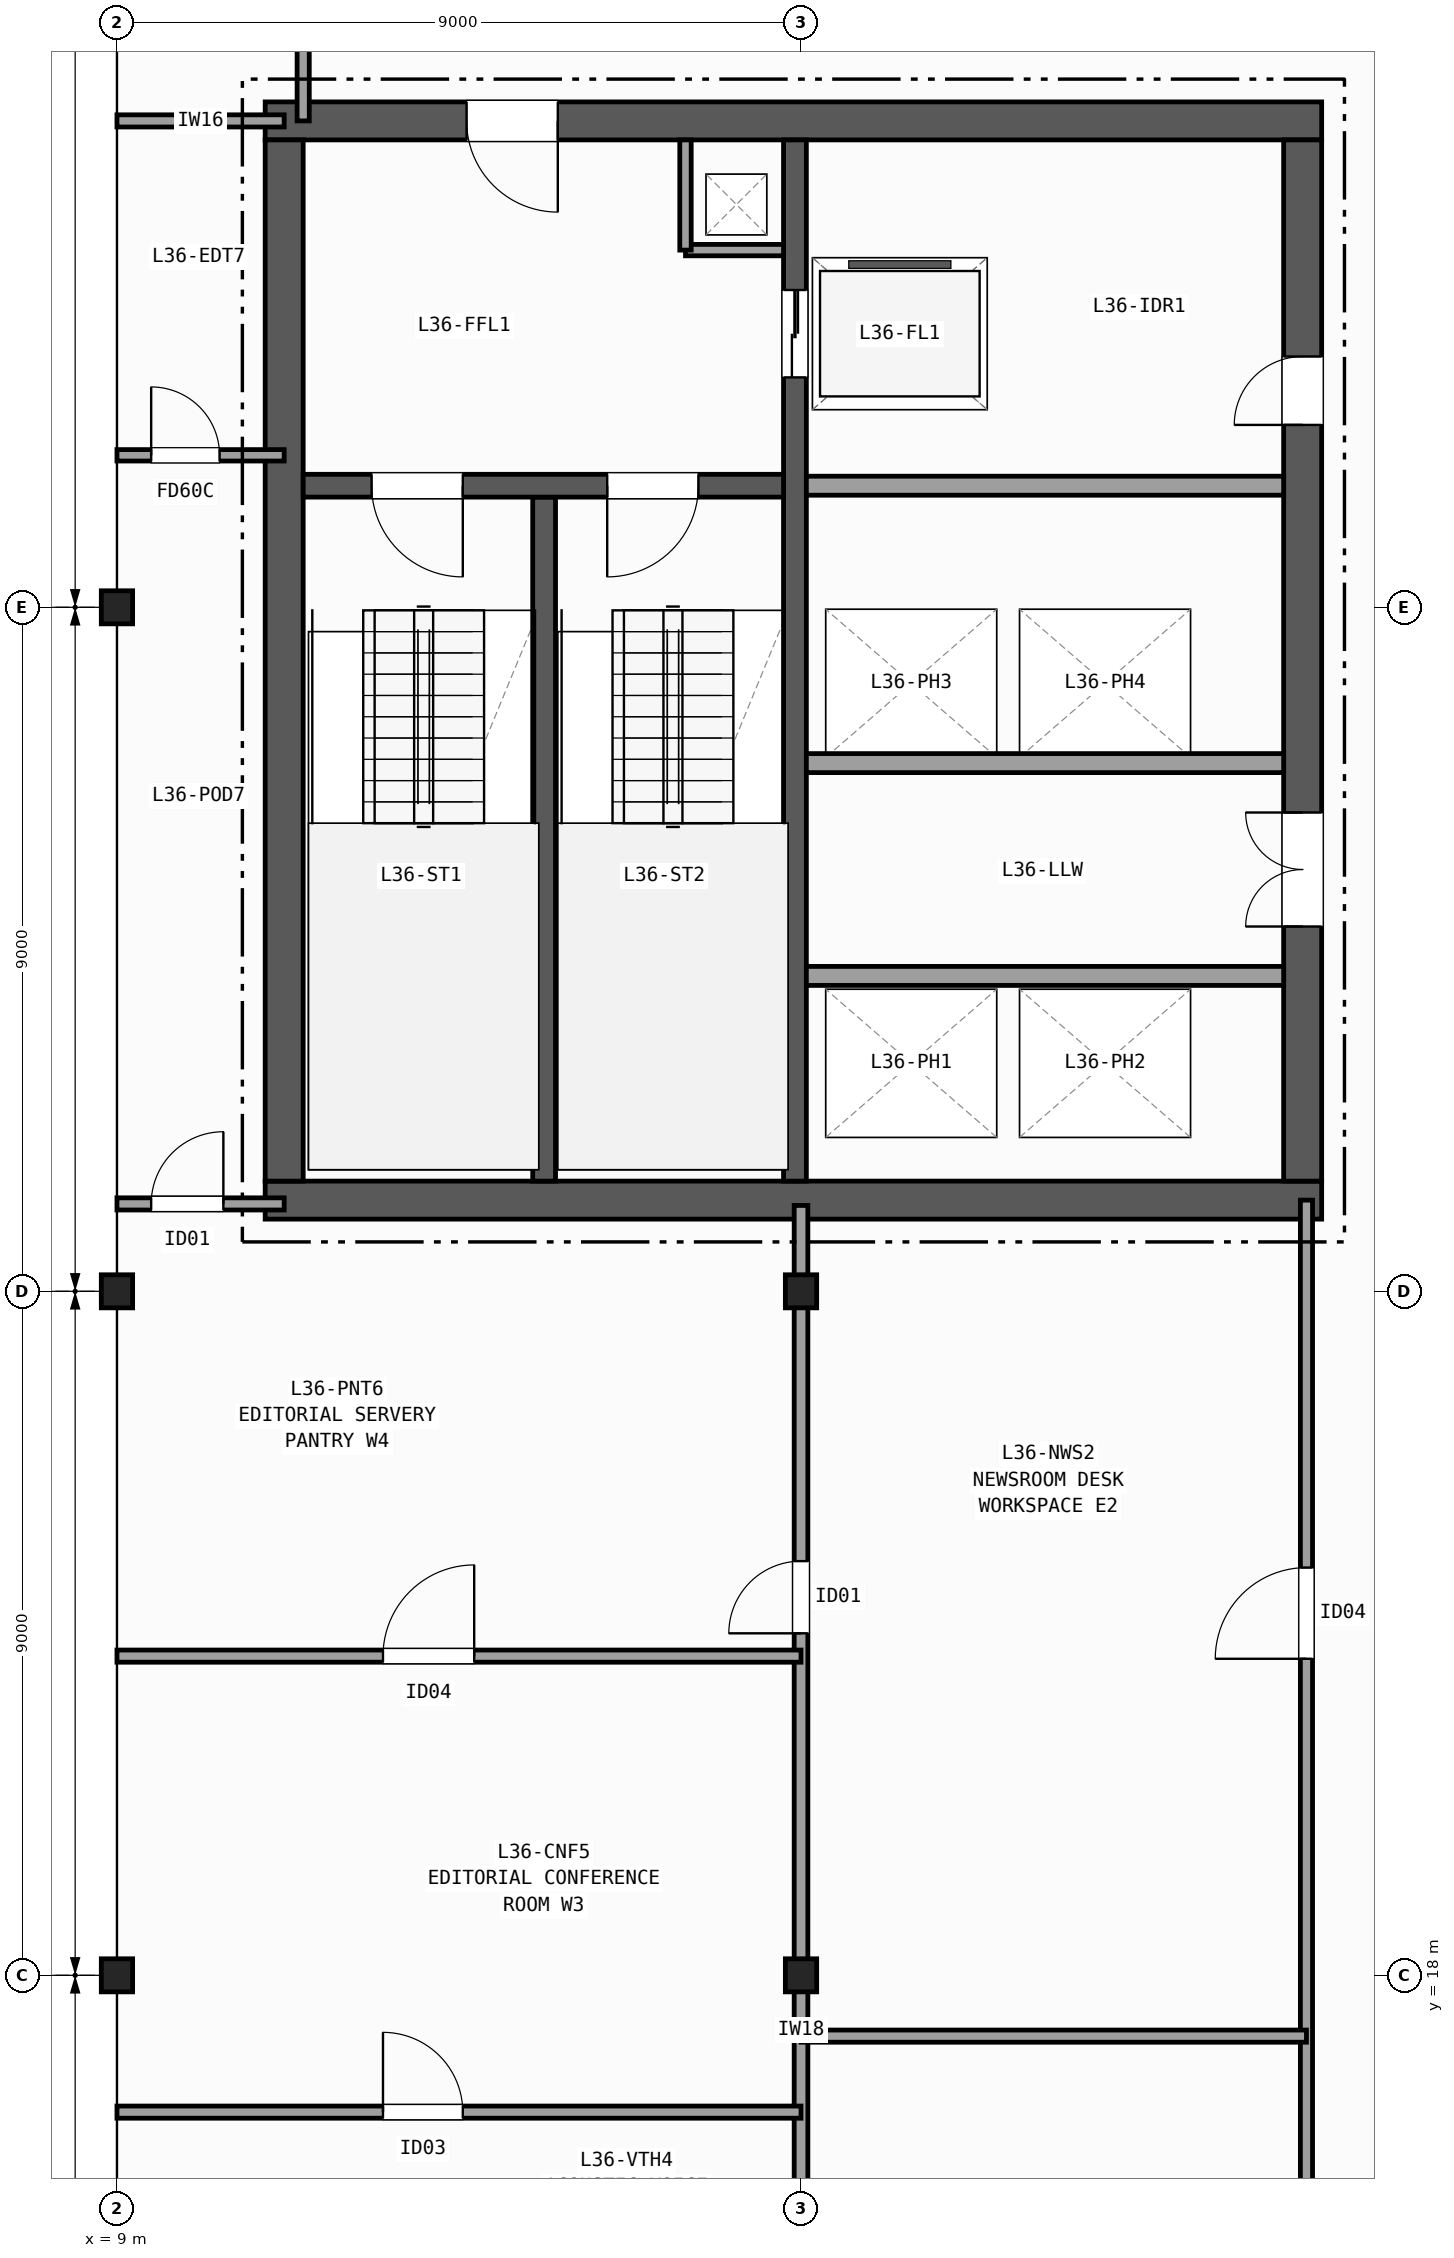
"""IFC4 building model, lengths in metres.
Left out: names, types, materials, properties, quantities, classifications, styles, units other than length and angle.
Written with IfcOpenShell. Run it as: python <this file> out.ifc"""

import sys

from ifc_helpers import new_model, si_unit, direction, frame, frame_2d, origin, origin_2d, place, context, subcontext, project, spatial, rectangle, i_section, extrude, element, fill, save


model = new_model("IFC4")
c1 = context("Model", 3, precision=1e-05, world=origin(), true_north=direction((0.0, 1.0)))
c2 = subcontext(c1, "Body", "Model", "MODEL_VIEW")
j1 = project(units=[si_unit("LENGTHUNIT", "METRE"), si_unit("PLANEANGLEUNIT", "RADIAN")], contexts=[c1])
p1 = place(None, origin())
s1 = spatial("IfcSite", under=j1, at=p1, CompositionType="ELEMENT")
p2 = place(p1, origin())
s2 = spatial("IfcBuilding", under=s1, at=p2, CompositionType="ELEMENT")
p3 = place(p2, frame((0.0, 0.0, 147.0)))
s3 = spatial("IfcBuildingStorey", under=s2, at=p3, CompositionType="ELEMENT", Elevation=147.0)
for number, where, z_axis, x_axis in (
    (1, (9.0, 18.0, 0.0), (0.0, 0.0, 1.0), (1.0, 0.0, 0.0)),
    (2, (9.0, 27.0, 0.0), (0.0, 0.0, 1.0), (1.0, 0.0, 0.0)),
    (3, (9.0, 36.0, 0.0), (0.0, 0.0, 1.0), (1.0, 0.0, 0.0)),
    (4, (18.0, 18.0, 0.0), (0.0, 0.0, 1.0), (1.0, 0.0, 0.0)),
    (5, (18.0, 27.0, 0.0), (0.0, 0.0, 1.0), (1.0, 0.0, 0.0)),
):
    element("IfcColumn", number, at=place(p3, frame(where, z_axis=z_axis, x_axis=x_axis)), inside=s3, PredefinedType="COLUMN", context=c2, shape_type="SweptSolid", body=[
        extrude(i_section(OverallWidth=0.412, OverallDepth=0.435, WebThickness=0.036, FlangeThickness=0.057, FilletRadius=0.015, at=origin_2d()), origin(), (0.0, 0.0, 1.0), 3.7),
    ])
p4 = place(p3, frame((10.95, 28.2, 0.0), z_axis=(0.0, 0.0, 1.0), x_axis=(1.0, 0.0, 0.0)))
e6 = element("IfcWall", 6, at=p4, inside=s3, PredefinedType="SHEAR", context=c2, shape_type="SweptSolid", body=[
    extrude(rectangle(XDim=13.9, YDim=0.5, at=frame_2d((6.95, 0.0))), origin(), (0.0, 0.0, 1.0), 3.42),
])
p5 = place(p3, frame((24.85, 42.4, 0.0), z_axis=(0.0, 0.0, 1.0), x_axis=(-1.0, 0.0, 0.0)))
e7 = element("IfcWall", 7, at=p5, inside=s3, PredefinedType="SHEAR", context=c2, shape_type="SweptSolid", body=[
    extrude(rectangle(XDim=13.9, YDim=0.5, at=frame_2d((6.95, 0.0))), origin(), (0.0, 0.0, 1.0), 3.42),
])
p6 = place(p5, frame((10.05, 0.0, 0.0)))
e8 = element("IfcOpeningElement", 8, at=p6, cuts=e7, PredefinedType="OPENING", context=c2, shape_type="SweptSolid", body=[
    extrude(rectangle(XDim=1.2, YDim=2.15, at=frame_2d((0.6, 1.075))), frame((0.0, 0.26, 0.0), z_axis=(0.0, -1.0, 0.0), x_axis=(1.0, 0.0, 0.0)), (0.0, 0.0, 1.0), 0.52),
])
p7 = place(p3, frame((11.2, 42.15, 0.0), z_axis=(0.0, 0.0, 1.0), x_axis=(0.0, -1.0, 0.0)))
e9 = element("IfcWall", 9, at=p7, inside=s3, PredefinedType="SHEAR", context=c2, shape_type="SweptSolid", body=[
    extrude(rectangle(XDim=13.7, YDim=0.5, at=frame_2d((6.85, 0.0))), origin(), (0.0, 0.0, 1.0), 3.42),
])
p8 = place(p3, frame((24.6, 28.45, 0.0), z_axis=(0.0, 0.0, 1.0), x_axis=(0.0, 1.0, 0.0)))
e10 = element("IfcWall", 10, at=p8, inside=s3, PredefinedType="SHEAR", context=c2, shape_type="SweptSolid", body=[
    extrude(rectangle(XDim=13.7, YDim=0.5, at=frame_2d((6.85, 0.0))), origin(), (0.0, 0.0, 1.0), 3.42),
])
p9 = place(p8, frame((3.35, 0.0, 0.0)))
e11 = element("IfcOpeningElement", 11, at=p9, cuts=e10, PredefinedType="OPENING", context=c2, shape_type="SweptSolid", body=[
    extrude(rectangle(XDim=1.5, YDim=2.2, at=frame_2d((0.75, 1.1))), frame((0.0, 0.26, 0.0), z_axis=(0.0, -1.0, 0.0), x_axis=(1.0, 0.0, 0.0)), (0.0, 0.0, 1.0), 0.52),
])
p10 = place(p8, frame((9.95, 0.0, 0.0)))
e12 = element("IfcOpeningElement", 12, at=p10, cuts=e10, PredefinedType="OPENING", context=c2, shape_type="SweptSolid", body=[
    extrude(rectangle(XDim=0.9, YDim=2.1, at=frame_2d((0.45, 1.05))), frame((0.0, 0.26, 0.0), z_axis=(0.0, -1.0, 0.0), x_axis=(1.0, 0.0, 0.0)), (0.0, 0.0, 1.0), 0.52),
])
p11 = place(p3, frame((14.62, 28.45, 0.0), z_axis=(0.0, 0.0, 1.0), x_axis=(0.0, 1.0, 0.0)))
e13 = element("IfcWall", 13, at=p11, inside=s3, PredefinedType="SHEAR", context=c2, shape_type="SweptSolid", body=[
    extrude(rectangle(XDim=9.0, YDim=0.3, at=frame_2d((4.5, 0.0))), origin(), (0.0, 0.0, 1.0), 3.42),
])
p12 = place(p3, frame((17.92, 42.15, 0.0), z_axis=(0.0, 0.0, 1.0), x_axis=(0.0, -1.0, 0.0)))
e14 = element("IfcWall", 14, at=p12, inside=s3, PredefinedType="SHEAR", context=c2, shape_type="SweptSolid", body=[
    extrude(rectangle(XDim=13.7, YDim=0.3, at=frame_2d((6.85, 0.0))), origin(), (0.0, 0.0, 1.0), 3.42),
])
p13 = place(p12, frame((1.975, 0.0, 0.0)))
e15 = element("IfcOpeningElement", 15, at=p13, cuts=e14, PredefinedType="OPENING", context=c2, shape_type="SweptSolid", body=[
    extrude(rectangle(XDim=1.15, YDim=2.15, at=frame_2d((0.575, 1.075))), frame((0.0, 0.16, 0.0), z_axis=(0.0, -1.0, 0.0), x_axis=(1.0, 0.0, 0.0)), (0.0, 0.0, 1.0), 0.32),
])
p14 = place(p3, frame((17.77, 37.6, 0.0), z_axis=(0.0, 0.0, 1.0), x_axis=(-1.0, 0.0, 0.0)))
e16 = element("IfcWall", 16, at=p14, inside=s3, PredefinedType="SHEAR", context=c2, shape_type="SweptSolid", body=[
    extrude(rectangle(XDim=6.32, YDim=0.3, at=frame_2d((3.16, 0.0))), origin(), (0.0, 0.0, 1.0), 3.42),
])
p15 = place(p14, frame((4.22, 0.0, 0.0)))
e17 = element("IfcOpeningElement", 17, at=p15, cuts=e16, PredefinedType="OPENING", context=c2, shape_type="SweptSolid", body=[
    extrude(rectangle(XDim=1.2, YDim=2.15, at=frame_2d((0.6, 1.075))), frame((0.0, 0.16, 0.0), z_axis=(0.0, -1.0, 0.0), x_axis=(1.0, 0.0, 0.0)), (0.0, 0.0, 1.0), 0.32),
])
p16 = place(p14, frame((1.12, 0.0, 0.0)))
e18 = element("IfcOpeningElement", 18, at=p16, cuts=e16, PredefinedType="OPENING", context=c2, shape_type="SweptSolid", body=[
    extrude(rectangle(XDim=1.2, YDim=2.15, at=frame_2d((0.6, 1.075))), frame((0.0, 0.16, 0.0), z_axis=(0.0, -1.0, 0.0), x_axis=(1.0, 0.0, 0.0)), (0.0, 0.0, 1.0), 0.32),
])
p17 = place(p3, frame((16.48, 40.7, 0.0), z_axis=(0.0, 0.0, 1.0), x_axis=(1.0, 0.0, 0.0)))
e19 = element("IfcWall", 19, at=p17, inside=s3, PredefinedType="PARTITIONING", context=c2, shape_type="SweptSolid", body=[
    extrude(rectangle(XDim=1.29, YDim=0.15, at=frame_2d((0.645, 0.0))), origin(), (0.0, 0.0, 1.0), 3.42),
])
p18 = place(p3, frame((16.48, 40.7, 0.0), z_axis=(0.0, 0.0, 1.0), x_axis=(0.0, 1.0, 0.0)))
e20 = element("IfcWall", 20, at=p18, inside=s3, PredefinedType="PARTITIONING", context=c2, shape_type="SweptSolid", body=[
    extrude(rectangle(XDim=1.45, YDim=0.15, at=frame_2d((0.725, 0.0))), origin(), (0.0, 0.0, 1.0), 3.42),
])
for number, where, z_axis, x_axis in (
    (21, (18.07, 37.6, 0.0), (0.0, 0.0, 1.0), (1.0, 0.0, 0.0)),
    (22, (18.07, 31.15, 0.0), (0.0, 0.0, 1.0), (1.0, 0.0, 0.0)),
    (23, (24.35, 33.95, 0.0), (0.0, 0.0, 1.0), (-1.0, 0.0, 0.0)),
):
    element("IfcWall", number, at=place(p3, frame(where, z_axis=z_axis, x_axis=x_axis)), inside=s3, PredefinedType="PARTITIONING", context=c2, shape_type="SweptSolid", body=[
        extrude(rectangle(XDim=6.28, YDim=0.25, at=frame_2d((3.14, 0.0))), origin(), (0.0, 0.0, 1.0), 3.42),
    ])
p19 = place(p3, frame((9.0, 28.15, 0.0), z_axis=(0.0, 0.0, 1.0), x_axis=(1.0, 0.0, 0.0)))
e24 = element("IfcWall", 24, at=p19, inside=s3, PredefinedType="PARTITIONING", context=c2, shape_type="SweptSolid", body=[
    extrude(rectangle(XDim=2.2, YDim=0.16, at=frame_2d((1.1, 0.0))), origin(), (0.0, 0.0, 1.0), 2.634),
])
p20 = place(p19, frame((0.45, 0.0, 0.0)))
e25 = element("IfcOpeningElement", 25, at=p20, cuts=e24, PredefinedType="OPENING", context=c2, shape_type="SweptSolid", body=[
    extrude(rectangle(XDim=0.95, YDim=2.1, at=frame_2d((0.475, 1.05))), frame((0.0, 0.09, 0.0), z_axis=(0.0, -1.0, 0.0), x_axis=(1.0, 0.0, 0.0)), (0.0, 0.0, 1.0), 0.18),
])
p21 = place(p3, frame((9.0, 42.4, 0.0), z_axis=(0.0, 0.0, 1.0), x_axis=(1.0, 0.0, 0.0)))
e26 = element("IfcWall", 26, at=p21, inside=s3, PredefinedType="PARTITIONING", context=c2, shape_type="SweptSolid", body=[
    extrude(rectangle(XDim=2.2, YDim=0.16, at=frame_2d((1.1, 0.0))), origin(), (0.0, 0.0, 1.0), 2.634),
])
p22 = place(p3, frame((11.45, 42.4, 0.0), z_axis=(0.0, 0.0, 1.0), x_axis=(0.0, 1.0, 0.0)))
e27 = element("IfcWall", 27, at=p22, inside=s3, PredefinedType="PARTITIONING", context=c2, shape_type="SweptSolid", body=[
    extrude(rectangle(XDim=2.1, YDim=0.16, at=frame_2d((1.05, 0.0))), origin(), (0.0, 0.0, 1.0), 3.42),
])
p23 = place(p3, frame((9.0, 38.0, 0.0), z_axis=(0.0, 0.0, 1.0), x_axis=(1.0, 0.0, 0.0)))
e28 = element("IfcWall", 28, at=p23, inside=s3, PredefinedType="PARTITIONING", context=c2, shape_type="SweptSolid", body=[
    extrude(rectangle(XDim=2.2, YDim=0.15, at=frame_2d((1.1, 0.0))), origin(), (0.0, 0.0, 1.0), 2.634),
])
p24 = place(p23, frame((0.45, 0.0, 0.0)))
e29 = element("IfcOpeningElement", 29, at=p24, cuts=e28, PredefinedType="OPENING", context=c2, shape_type="SweptSolid", body=[
    extrude(rectangle(XDim=0.9, YDim=2.1, at=frame_2d((0.45, 1.05))), frame((0.0, 0.085, 0.0), z_axis=(0.0, -1.0, 0.0), x_axis=(1.0, 0.0, 0.0)), (0.0, 0.0, 1.0), 0.17),
])
p25 = place(p3, frame((24.65, 9.0, 0.0), z_axis=(0.0, 0.0, 1.0), x_axis=(0.0, 1.0, 0.0)))
e30 = element("IfcWall", 30, at=p25, inside=s3, PredefinedType="PARTITIONING", context=c2, shape_type="SweptSolid", body=[
    extrude(rectangle(XDim=19.2, YDim=0.16, at=frame_2d((9.6, 0.0))), origin(), (0.0, 0.0, 1.0), 2.634),
])
p26 = place(p25, frame((3.6, 0.0, 0.0)))
e31 = element("IfcOpeningElement", 31, at=p26, cuts=e30, PredefinedType="OPENING", context=c2, shape_type="SweptSolid", body=[
    extrude(rectangle(XDim=1.05, YDim=2.15, at=frame_2d((0.525, 1.075))), frame((0.0, 0.09, 0.0), z_axis=(0.0, -1.0, 0.0), x_axis=(1.0, 0.0, 0.0)), (0.0, 0.0, 1.0), 0.18),
])
p27 = place(p25, frame((13.165, 0.0, 0.0)))
e32 = element("IfcOpeningElement", 32, at=p27, cuts=e30, PredefinedType="OPENING", context=c2, shape_type="SweptSolid", body=[
    extrude(rectangle(XDim=1.2, YDim=2.15, at=frame_2d((0.6, 1.075))), frame((0.0, 0.09, 0.0), z_axis=(0.0, -1.0, 0.0), x_axis=(1.0, 0.0, 0.0)), (0.0, 0.0, 1.0), 0.18),
])
p28 = place(p3, frame((18.0, 9.0, 0.0), z_axis=(0.0, 0.0, 1.0), x_axis=(0.0, 1.0, 0.0)))
e33 = element("IfcWall", 33, at=p28, inside=s3, PredefinedType="PARTITIONING", context=c2, shape_type="SweptSolid", body=[
    extrude(rectangle(XDim=19.13, YDim=0.18, at=frame_2d((9.565, 0.0))), origin(), (0.0, 0.0, 1.0), 2.634),
])
p29 = place(p28, frame((2.2, 0.0, 0.0)))
e34 = element("IfcOpeningElement", 34, at=p29, cuts=e33, PredefinedType="OPENING", context=c2, shape_type="SweptSolid", body=[
    extrude(rectangle(XDim=0.86, YDim=2.05, at=frame_2d((0.43, 1.025))), frame((0.0, 0.1, 0.0), z_axis=(0.0, -1.0, 0.0), x_axis=(1.0, 0.0, 0.0)), (0.0, 0.0, 1.0), 0.2),
])
p30 = place(p28, frame((13.5, 0.0, 0.0)))
e35 = element("IfcOpeningElement", 35, at=p30, cuts=e33, PredefinedType="OPENING", context=c2, shape_type="SweptSolid", body=[
    extrude(rectangle(XDim=0.95, YDim=2.1, at=frame_2d((0.475, 1.05))), frame((0.0, 0.1, 0.0), z_axis=(0.0, -1.0, 0.0), x_axis=(1.0, 0.0, 0.0)), (0.0, 0.0, 1.0), 0.2),
])
p31 = place(p3, frame((18.0, 17.2, 0.0), z_axis=(0.0, 0.0, 1.0), x_axis=(1.0, 0.0, 0.0)))
e36 = element("IfcWall", 36, at=p31, inside=s3, PredefinedType="PARTITIONING", context=c2, shape_type="SweptSolid", body=[
    extrude(rectangle(XDim=6.65, YDim=0.16, at=frame_2d((3.325, 0.0))), origin(), (0.0, 0.0, 1.0), 2.789),
])
p32 = place(p3, frame((9.0, 16.2, 0.0), z_axis=(0.0, 0.0, 1.0), x_axis=(1.0, 0.0, 0.0)))
e37 = element("IfcWall", 37, at=p32, inside=s3, PredefinedType="PARTITIONING", context=c2, shape_type="SweptSolid", body=[
    extrude(rectangle(XDim=9.0, YDim=0.16, at=frame_2d((4.5, 0.0))), origin(), (0.0, 0.0, 1.0), 2.792),
])
p33 = place(p32, frame((3.5, 0.0, 0.0)))
e38 = element("IfcOpeningElement", 38, at=p33, cuts=e37, PredefinedType="OPENING", context=c2, shape_type="SweptSolid", body=[
    extrude(rectangle(XDim=1.05, YDim=2.15, at=frame_2d((0.525, 1.075))), frame((0.0, 0.09, 0.0), z_axis=(0.0, -1.0, 0.0), x_axis=(1.0, 0.0, 0.0)), (0.0, 0.0, 1.0), 0.18),
])
p34 = place(p3, frame((9.0, 22.2, 0.0), z_axis=(0.0, 0.0, 1.0), x_axis=(1.0, 0.0, 0.0)))
e39 = element("IfcWall", 39, at=p34, inside=s3, PredefinedType="PARTITIONING", context=c2, shape_type="SweptSolid", body=[
    extrude(rectangle(XDim=9.0, YDim=0.16, at=frame_2d((4.5, 0.0))), origin(), (0.0, 0.0, 1.0), 2.634),
])
p35 = place(p34, frame((3.5, 0.0, 0.0)))
e40 = element("IfcOpeningElement", 40, at=p35, cuts=e39, PredefinedType="OPENING", context=c2, shape_type="SweptSolid", body=[
    extrude(rectangle(XDim=1.2, YDim=2.15, at=frame_2d((0.6, 1.075))), frame((0.0, 0.09, 0.0), z_axis=(0.0, -1.0, 0.0), x_axis=(1.0, 0.0, 0.0)), (0.0, 0.0, 1.0), 0.18),
])
p36 = place(p15, origin())
e41 = element("IfcDoor", 41, at=p36, inside=s3, OperationType="SINGLE_SWING_LEFT", PredefinedType="DOOR", context=c2, shape_type="SweptSolid", body=[
    extrude(rectangle(XDim=1.2, YDim=2.15, at=frame_2d((0.6, 1.075))), frame((0.0, 0.025, 0.0), z_axis=(0.0, -1.0, 0.0), x_axis=(1.0, 0.0, 0.0)), (0.0, 0.0, 1.0), 0.05),
])
fill(e17, e41)
p37 = place(p16, origin())
e42 = element("IfcDoor", 42, at=p37, inside=s3, OperationType="SINGLE_SWING_RIGHT", PredefinedType="DOOR", context=c2, shape_type="SweptSolid", body=[
    extrude(rectangle(XDim=1.2, YDim=2.15, at=frame_2d((0.6, 1.075))), frame((0.0, 0.025, 0.0), z_axis=(0.0, -1.0, 0.0), x_axis=(1.0, 0.0, 0.0)), (0.0, 0.0, 1.0), 0.05),
])
fill(e18, e42)
p38 = place(p9, origin())
e43 = element("IfcDoor", 43, at=p38, inside=s3, OperationType="DOUBLE_DOOR_SINGLE_SWING", PredefinedType="DOOR", context=c2, shape_type="SweptSolid", body=[
    extrude(rectangle(XDim=1.5, YDim=2.2, at=frame_2d((0.75, 1.1))), frame((0.0, 0.025, 0.0), z_axis=(0.0, -1.0, 0.0), x_axis=(1.0, 0.0, 0.0)), (0.0, 0.0, 1.0), 0.05),
])
fill(e11, e43)
p39 = place(p6, origin())
e44 = element("IfcDoor", 44, at=p39, inside=s3, OperationType="SINGLE_SWING_LEFT", PredefinedType="DOOR", context=c2, shape_type="SweptSolid", body=[
    extrude(rectangle(XDim=1.2, YDim=2.15, at=frame_2d((0.6, 1.075))), frame((0.0, 0.025, 0.0), z_axis=(0.0, -1.0, 0.0), x_axis=(1.0, 0.0, 0.0)), (0.0, 0.0, 1.0), 0.05),
])
fill(e8, e44)
p40 = place(p10, origin())
e45 = element("IfcDoor", 45, at=p40, inside=s3, OperationType="SINGLE_SWING_LEFT", PredefinedType="DOOR", context=c2, shape_type="SweptSolid", body=[
    extrude(rectangle(XDim=0.9, YDim=2.1, at=frame_2d((0.45, 1.05))), frame((0.0, 0.025, 0.0), z_axis=(0.0, -1.0, 0.0), x_axis=(1.0, 0.0, 0.0)), (0.0, 0.0, 1.0), 0.05),
])
fill(e12, e45)
p41 = place(p13, origin())
e46 = element("IfcDoor", 46, at=p41, inside=s3, OperationType="DOUBLE_DOOR_SLIDING", PredefinedType="DOOR", context=c2, shape_type="SweptSolid", body=[
    extrude(rectangle(XDim=1.15, YDim=2.15, at=frame_2d((0.575, 1.075))), frame((0.0, 0.025, 0.0), z_axis=(0.0, -1.0, 0.0), x_axis=(1.0, 0.0, 0.0)), (0.0, 0.0, 1.0), 0.05),
])
fill(e15, e46)
p42 = place(p20, origin())
e47 = element("IfcDoor", 47, at=p42, inside=s3, OperationType="SINGLE_SWING_RIGHT", PredefinedType="DOOR", context=c2, shape_type="SweptSolid", body=[
    extrude(rectangle(XDim=0.95, YDim=2.1, at=frame_2d((0.475, 1.05))), frame((0.0, 0.025, 0.0), z_axis=(0.0, -1.0, 0.0), x_axis=(1.0, 0.0, 0.0)), (0.0, 0.0, 1.0), 0.05),
])
fill(e25, e47)
p43 = place(p24, origin())
e48 = element("IfcDoor", 48, at=p43, inside=s3, OperationType="SINGLE_SWING_LEFT", PredefinedType="DOOR", context=c2, shape_type="SweptSolid", body=[
    extrude(rectangle(XDim=0.9, YDim=2.1, at=frame_2d((0.45, 1.05))), frame((0.0, 0.025, 0.0), z_axis=(0.0, -1.0, 0.0), x_axis=(1.0, 0.0, 0.0)), (0.0, 0.0, 1.0), 0.05),
])
fill(e29, e48)
p44 = place(p27, origin())
e49 = element("IfcDoor", 49, at=p44, inside=s3, OperationType="SINGLE_SWING_LEFT", PredefinedType="DOOR", context=c2, shape_type="SweptSolid", body=[
    extrude(rectangle(XDim=1.2, YDim=2.15, at=frame_2d((0.6, 1.075))), frame((0.0, 0.025, 0.0), z_axis=(0.0, -1.0, 0.0), x_axis=(1.0, 0.0, 0.0)), (0.0, 0.0, 1.0), 0.05),
])
fill(e32, e49)
p45 = place(p30, origin())
e50 = element("IfcDoor", 50, at=p45, inside=s3, OperationType="SINGLE_SWING_LEFT", PredefinedType="DOOR", context=c2, shape_type="SweptSolid", body=[
    extrude(rectangle(XDim=0.95, YDim=2.1, at=frame_2d((0.475, 1.05))), frame((0.0, 0.025, 0.0), z_axis=(0.0, -1.0, 0.0), x_axis=(1.0, 0.0, 0.0)), (0.0, 0.0, 1.0), 0.05),
])
fill(e35, e50)
p46 = place(p33, origin())
e51 = element("IfcDoor", 51, at=p46, inside=s3, OperationType="SINGLE_SWING_LEFT", PredefinedType="DOOR", context=c2, shape_type="SweptSolid", body=[
    extrude(rectangle(XDim=1.05, YDim=2.15, at=frame_2d((0.525, 1.075))), frame((0.0, 0.025, 0.0), z_axis=(0.0, -1.0, 0.0), x_axis=(1.0, 0.0, 0.0)), (0.0, 0.0, 1.0), 0.05),
])
fill(e38, e51)
p47 = place(p35, origin())
e52 = element("IfcDoor", 52, at=p47, inside=s3, OperationType="SINGLE_SWING_RIGHT", PredefinedType="DOOR", context=c2, shape_type="SweptSolid", body=[
    extrude(rectangle(XDim=1.2, YDim=2.15, at=frame_2d((0.6, 1.075))), frame((0.0, 0.025, 0.0), z_axis=(0.0, -1.0, 0.0), x_axis=(1.0, 0.0, 0.0)), (0.0, 0.0, 1.0), 0.05),
])
fill(e40, e52)
save(model, sys.argv[1])
